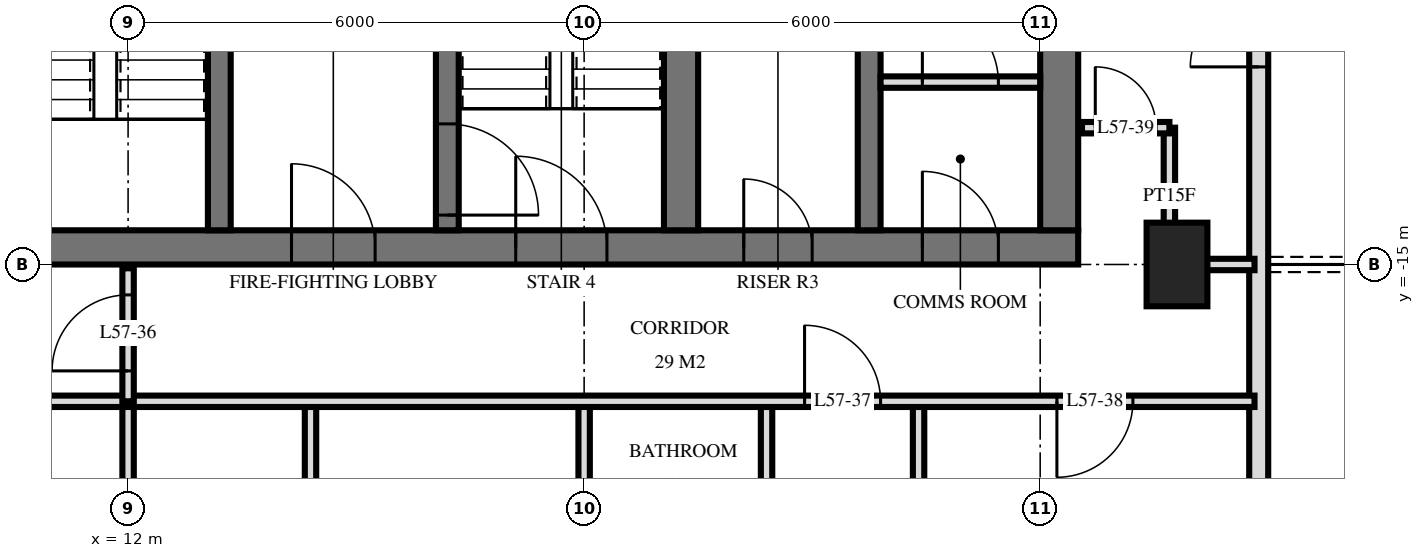
"""IFC4 building model, lengths in metres.
Left out: names, types, materials, properties, quantities, classifications, styles, units other than length and angle.
Written with IfcOpenShell. Run it as: python <this file> out.ifc"""

import sys

from ifc_helpers import new_model, si_unit, direction, frame, frame_2d, origin, origin_2d, place, context, subcontext, project, spatial, rectangle, extrude, element, fill, save


model = new_model("IFC4")
c1 = context("Model", 3, precision=1e-05, world=origin(), true_north=direction((0.0, 1.0)))
c2 = subcontext(c1, "Body", "Model", "MODEL_VIEW")
j1 = project(units=[si_unit("LENGTHUNIT", "METRE"), si_unit("PLANEANGLEUNIT", "RADIAN")], contexts=[c1])
p1 = place(None, origin())
s1 = spatial("IfcSite", under=j1, at=p1, CompositionType="ELEMENT")
p2 = place(p1, origin())
s2 = spatial("IfcBuilding", under=s1, at=p2, CompositionType="ELEMENT")
p3 = place(p2, frame((0.0, 0.0, 218.6)))
s3 = spatial("IfcBuildingStorey", under=s2, at=p3, CompositionType="ELEMENT", Elevation=218.6)
p4 = place(p3, frame((25.8, -15.0, 0.0), z_axis=(0.0, 0.0, 1.0), x_axis=(0.0, 1.0, 0.0)))
e1 = element("IfcColumn", 1, at=p4, inside=s3, PredefinedType="COLUMN", context=c2, shape_type="SweptSolid", body=[
    extrude(rectangle(XDim=1.1, YDim=0.8, at=origin_2d()), origin(), (0.0, 0.0, 1.0), 3.5),
])
p5 = place(p3, frame((10.0, -14.775, 0.0), z_axis=(0.0, 0.0, 1.0), x_axis=(1.0, 0.0, 0.0)))
e2 = element("IfcWall", 2, at=p5, inside=s3, PredefinedType="SHEAR", context=c2, shape_type="SweptSolid", body=[
    extrude(rectangle(XDim=14.5, YDim=0.45, at=frame_2d((7.25, 0.0))), origin(), (0.0, 0.0, 1.0), 3.5),
])
p6 = place(p5, frame((7.1, 0.0, 0.0)))
e3 = element("IfcOpeningElement", 3, at=p6, cuts=e2, PredefinedType="OPENING", context=c2, shape_type="SweptSolid", body=[
    extrude(rectangle(XDim=1.2, YDim=2.1, at=frame_2d((0.6, 1.05))), frame((0.0, 0.235, 0.0), z_axis=(0.0, -1.0, 0.0), x_axis=(1.0, 0.0, 0.0)), (0.0, 0.0, 1.0), 0.47),
])
p7 = place(p5, frame((4.15, 0.0, 0.0)))
e4 = element("IfcOpeningElement", 4, at=p7, cuts=e2, PredefinedType="OPENING", context=c2, shape_type="SweptSolid", body=[
    extrude(rectangle(XDim=1.1, YDim=2.1, at=frame_2d((0.55, 1.05))), frame((0.0, 0.235, 0.0), z_axis=(0.0, -1.0, 0.0), x_axis=(1.0, 0.0, 0.0)), (0.0, 0.0, 1.0), 0.47),
])
p8 = place(p5, frame((10.1, 0.0, 0.0)))
e5 = element("IfcOpeningElement", 5, at=p8, cuts=e2, PredefinedType="OPENING", context=c2, shape_type="SweptSolid", body=[
    extrude(rectangle(XDim=0.9, YDim=2.1, at=frame_2d((0.45, 1.05))), frame((0.0, 0.235, 0.0), z_axis=(0.0, -1.0, 0.0), x_axis=(1.0, 0.0, 0.0)), (0.0, 0.0, 1.0), 0.47),
])
p9 = place(p5, frame((12.45, 0.0, 0.0)))
e6 = element("IfcOpeningElement", 6, at=p9, cuts=e2, PredefinedType="OPENING", context=c2, shape_type="SweptSolid", body=[
    extrude(rectangle(XDim=1.0, YDim=2.1, at=frame_2d((0.5, 1.05))), frame((0.0, 0.235, 0.0), z_axis=(0.0, -1.0, 0.0), x_axis=(1.0, 0.0, 0.0)), (0.0, 0.0, 1.0), 0.47),
])
p10 = place(p3, frame((24.25, -14.55, 0.0), z_axis=(0.0, 0.0, 1.0), x_axis=(0.0, 1.0, 0.0)))
e7 = element("IfcWall", 7, at=p10, inside=s3, PredefinedType="SHEAR", context=c2, shape_type="SweptSolid", body=[
    extrude(rectangle(XDim=14.1, YDim=0.5, at=frame_2d((7.05, 0.0))), origin(), (0.0, 0.0, 1.0), 3.5),
])
p11 = place(p3, frame((13.2, -14.55, 0.0), z_axis=(0.0, 0.0, 1.0), x_axis=(0.0, 1.0, 0.0)))
e8 = element("IfcWall", 8, at=p11, inside=s3, PredefinedType="SHEAR", context=c2, shape_type="SweptSolid", body=[
    extrude(rectangle(XDim=5.4, YDim=0.3, at=frame_2d((2.7, 0.0))), origin(), (0.0, 0.0, 1.0), 3.5),
])
p12 = place(p11, frame((4.0, 0.0, 0.0)))
e9 = element("IfcOpeningElement", 9, at=p12, cuts=e8, PredefinedType="OPENING", context=c2, shape_type="SweptSolid", body=[
    extrude(rectangle(XDim=1.2, YDim=2.1, at=frame_2d((0.6, 1.05))), frame((0.0, 0.16, 0.0), z_axis=(0.0, -1.0, 0.0), x_axis=(1.0, 0.0, 0.0)), (0.0, 0.0, 1.0), 0.32),
])
p13 = place(p3, frame((16.2, -14.55, 0.0), z_axis=(0.0, 0.0, 1.0), x_axis=(0.0, 1.0, 0.0)))
e10 = element("IfcWall", 10, at=p13, inside=s3, PredefinedType="SHEAR", context=c2, shape_type="SweptSolid", body=[
    extrude(rectangle(XDim=5.4, YDim=0.3, at=frame_2d((2.7, 0.0))), origin(), (0.0, 0.0, 1.0), 3.5),
])
p14 = place(p13, frame((0.2, 0.0, 0.0)))
e11 = element("IfcOpeningElement", 11, at=p14, cuts=e10, PredefinedType="OPENING", context=c2, shape_type="SweptSolid", body=[
    extrude(rectangle(XDim=1.2, YDim=2.1, at=frame_2d((0.6, 1.05))), frame((0.0, 0.16, 0.0), z_axis=(0.0, -1.0, 0.0), x_axis=(1.0, 0.0, 0.0)), (0.0, 0.0, 1.0), 0.32),
])
p15 = place(p3, frame((19.275, -14.55, 0.0), z_axis=(0.0, 0.0, 1.0), x_axis=(0.0, 1.0, 0.0)))
e12 = element("IfcWall", 12, at=p15, inside=s3, PredefinedType="SHEAR", context=c2, shape_type="SweptSolid", body=[
    extrude(rectangle(XDim=5.4, YDim=0.45, at=frame_2d((2.7, 0.0))), origin(), (0.0, 0.0, 1.0), 3.5),
])
p16 = place(p3, frame((21.75, -14.55, 0.0), z_axis=(0.0, 0.0, 1.0), x_axis=(0.0, 1.0, 0.0)))
e13 = element("IfcWall", 13, at=p16, inside=s3, PredefinedType="SHEAR", context=c2, shape_type="SweptSolid", body=[
    extrude(rectangle(XDim=5.4, YDim=0.3, at=frame_2d((2.7, 0.0))), origin(), (0.0, 0.0, 1.0), 3.5),
])
p17 = place(p3, frame((26.875, -24.875, 0.0), z_axis=(0.0, 0.0, 1.0), x_axis=(0.0, 1.0, 0.0)))
e14 = element("IfcWall", 14, at=p17, inside=s3, PredefinedType="SOLIDWALL", context=c2, shape_type="SweptSolid", body=[
    extrude(rectangle(XDim=21.551, YDim=0.25, at=frame_2d((10.775, 0.0))), origin(), (0.0, 0.0, 1.0), 3.22),
])
p18 = place(p17, frame((0.575, 0.0, 0.0)))
e15 = element("IfcOpeningElement", 15, at=p18, cuts=e14, PredefinedType="OPENING", context=c2, shape_type="SweptSolid", body=[
    extrude(rectangle(XDim=1.8, YDim=2.4, at=frame_2d((0.9, 1.2))), frame((0.0, 0.135, 0.0), z_axis=(0.0, -1.0, 0.0), x_axis=(1.0, 0.0, 0.0)), (0.0, 0.0, 1.0), 0.27),
])
p19 = place(p17, frame((5.075, 0.0, 0.0)))
e16 = element("IfcOpeningElement", 16, at=p19, cuts=e14, PredefinedType="OPENING", context=c2, shape_type="SweptSolid", body=[
    extrude(rectangle(XDim=1.8, YDim=2.4, at=frame_2d((0.9, 1.2))), frame((0.0, 0.135, 0.0), z_axis=(0.0, -1.0, 0.0), x_axis=(1.0, 0.0, 0.0)), (0.0, 0.0, 1.0), 0.27),
])
p20 = place(p17, frame((12.475, 0.0, 0.0)))
e17 = element("IfcOpeningElement", 17, at=p20, cuts=e14, PredefinedType="OPENING", context=c2, shape_type="SweptSolid", body=[
    extrude(rectangle(XDim=1.8, YDim=2.4, at=frame_2d((0.9, 1.2))), frame((0.0, 0.135, 0.0), z_axis=(0.0, -1.0, 0.0), x_axis=(1.0, 0.0, 0.0)), (0.0, 0.0, 1.0), 0.27),
])
p21 = place(p3, frame((21.9, -12.6, 0.0), z_axis=(0.0, 0.0, 1.0), x_axis=(1.0, 0.0, 0.0)))
e18 = element("IfcWall", 18, at=p21, inside=s3, PredefinedType="PARTITIONING", context=c2, shape_type="SweptSolid", body=[
    extrude(rectangle(XDim=2.1, YDim=0.15, at=frame_2d((1.05, 0.0))), origin(), (0.0, 0.0, 1.0), 3.2),
])
p22 = place(p21, frame((0.55, 0.0, 0.0)))
e19 = element("IfcOpeningElement", 19, at=p22, cuts=e18, PredefinedType="OPENING", context=c2, shape_type="SweptSolid", body=[
    extrude(rectangle(XDim=1.0, YDim=2.1, at=frame_2d((0.5, 1.05))), frame((0.0, 0.085, 0.0), z_axis=(0.0, -1.0, 0.0), x_axis=(1.0, 0.0, 0.0)), (0.0, 0.0, 1.0), 0.17),
])
p23 = place(p3, frame((25.7, -15.0, 0.0), z_axis=(0.0, 0.0, 1.0), x_axis=(0.0, 1.0, 0.0)))
e20 = element("IfcWall", 20, at=p23, inside=s3, PredefinedType="PARTITIONING", context=c2, shape_type="SweptSolid", body=[
    extrude(rectangle(XDim=1.8, YDim=0.15, at=frame_2d((0.9, 0.0))), origin(), (0.0, 0.0, 1.0), 3.22),
])
p24 = place(p3, frame((22.4, -21.0, 0.0), z_axis=(0.0, 0.0, 1.0), x_axis=(0.0, 1.0, 0.0)))
e21 = element("IfcWall", 21, at=p24, inside=s3, PredefinedType="PARTITIONING", context=c2, shape_type="SweptSolid", body=[
    extrude(rectangle(XDim=4.2, YDim=0.15, at=frame_2d((2.1, 0.0))), origin(), (0.0, 0.0, 1.0), 3.22),
])
p25 = place(p3, frame((20.4, -21.0, 0.0), z_axis=(0.0, 0.0, 1.0), x_axis=(0.0, 1.0, 0.0)))
e22 = element("IfcWall", 22, at=p25, inside=s3, PredefinedType="PARTITIONING", context=c2, shape_type="SweptSolid", body=[
    extrude(rectangle(XDim=4.2, YDim=0.15, at=frame_2d((2.1, 0.0))), origin(), (0.0, 0.0, 1.0), 3.22),
])
p26 = place(p25, frame((1.6, 0.0, 0.0)))
e23 = element("IfcOpeningElement", 23, at=p26, cuts=e22, PredefinedType="OPENING", context=c2, shape_type="SweptSolid", body=[
    extrude(rectangle(XDim=1.0, YDim=2.1, at=frame_2d((0.5, 1.05))), frame((0.0, 0.085, 0.0), z_axis=(0.0, -1.0, 0.0), x_axis=(1.0, 0.0, 0.0)), (0.0, 0.0, 1.0), 0.17),
])
for number, where, z_axis, x_axis in (
    (24, (18.0, -21.0, 0.0), (0.0, 0.0, 1.0), (0.0, 1.0, 0.0)),
    (25, (14.4, -21.0, 0.0), (0.0, 0.0, 1.0), (0.0, 1.0, 0.0)),
):
    element("IfcWall", number, at=place(p3, frame(where, z_axis=z_axis, x_axis=x_axis)), inside=s3, PredefinedType="PARTITIONING", context=c2, shape_type="SweptSolid", body=[
        extrude(rectangle(XDim=4.2, YDim=0.15, at=frame_2d((2.1, 0.0))), origin(), (0.0, 0.0, 1.0), 3.22),
    ])
p27 = place(p3, frame((12.0, -16.8, 0.0), z_axis=(0.0, 0.0, 1.0), x_axis=(0.0, 1.0, 0.0)))
e26 = element("IfcWall", 26, at=p27, inside=s3, PredefinedType="PARTITIONING", context=c2, shape_type="SweptSolid", body=[
    extrude(rectangle(XDim=1.75, YDim=0.15, at=frame_2d((0.875, 0.0))), origin(), (0.0, 0.0, 1.0), 3.22),
])
p28 = place(p27, frame((0.4, 0.0, 0.0)))
e27 = element("IfcOpeningElement", 27, at=p28, cuts=e26, PredefinedType="OPENING", context=c2, shape_type="SweptSolid", body=[
    extrude(rectangle(XDim=1.0, YDim=2.1, at=frame_2d((0.5, 1.05))), frame((0.0, 0.085, 0.0), z_axis=(0.0, -1.0, 0.0), x_axis=(1.0, 0.0, 0.0)), (0.0, 0.0, 1.0), 0.17),
])
p29 = place(p3, frame((12.0, -29.22, 0.0), z_axis=(0.0, 0.0, 1.0), x_axis=(0.0, 1.0, 0.0)))
e28 = element("IfcWall", 28, at=p29, inside=s3, PredefinedType="PARTITIONING", context=c2, shape_type="SweptSolid", body=[
    extrude(rectangle(XDim=12.42, YDim=0.15, at=frame_2d((6.21, 0.0))), origin(), (0.0, 0.0, 1.0), 3.22),
])
p30 = place(p3, frame((-26.82, -16.8, 0.0), z_axis=(0.0, 0.0, 1.0), x_axis=(1.0, 0.0, 0.0)))
e29 = element("IfcWall", 29, at=p30, inside=s3, PredefinedType="PARTITIONING", context=c2, shape_type="SweptSolid", body=[
    extrude(rectangle(XDim=53.64, YDim=0.15, at=frame_2d((26.82, 0.0))), origin(), (0.0, 0.0, 1.0), 3.22),
])
p31 = place(p30, frame((11.17, 0.0, 0.0)))
e30 = element("IfcOpeningElement", 30, at=p31, cuts=e29, PredefinedType="OPENING", context=c2, shape_type="SweptSolid", body=[
    extrude(rectangle(XDim=1.0, YDim=2.1, at=frame_2d((0.5, 1.05))), frame((0.0, 0.085, 0.0), z_axis=(0.0, -1.0, 0.0), x_axis=(1.0, 0.0, 0.0)), (0.0, 0.0, 1.0), 0.17),
])
p32 = place(p30, frame((3.22, 0.0, 0.0)))
e31 = element("IfcOpeningElement", 31, at=p32, cuts=e29, PredefinedType="OPENING", context=c2, shape_type="SweptSolid", body=[
    extrude(rectangle(XDim=1.0, YDim=2.1, at=frame_2d((0.5, 1.05))), frame((0.0, 0.085, 0.0), z_axis=(0.0, -1.0, 0.0), x_axis=(1.0, 0.0, 0.0)), (0.0, 0.0, 1.0), 0.17),
])
p33 = place(p30, frame((5.02, 0.0, 0.0)))
e32 = element("IfcOpeningElement", 32, at=p33, cuts=e29, PredefinedType="OPENING", context=c2, shape_type="SweptSolid", body=[
    extrude(rectangle(XDim=1.0, YDim=2.1, at=frame_2d((0.5, 1.05))), frame((0.0, 0.085, 0.0), z_axis=(0.0, -1.0, 0.0), x_axis=(1.0, 0.0, 0.0)), (0.0, 0.0, 1.0), 0.17),
])
p34 = place(p30, frame((47.72, 0.0, 0.0)))
e33 = element("IfcOpeningElement", 33, at=p34, cuts=e29, PredefinedType="OPENING", context=c2, shape_type="SweptSolid", body=[
    extrude(rectangle(XDim=1.0, YDim=2.1, at=frame_2d((0.5, 1.05))), frame((0.0, 0.085, 0.0), z_axis=(0.0, -1.0, 0.0), x_axis=(1.0, 0.0, 0.0)), (0.0, 0.0, 1.0), 0.17),
])
p35 = place(p30, frame((51.04, 0.0, 0.0)))
e34 = element("IfcOpeningElement", 34, at=p35, cuts=e29, PredefinedType="OPENING", context=c2, shape_type="SweptSolid", body=[
    extrude(rectangle(XDim=1.0, YDim=2.1, at=frame_2d((0.5, 1.05))), frame((0.0, 0.085, 0.0), z_axis=(0.0, -1.0, 0.0), x_axis=(1.0, 0.0, 0.0)), (0.0, 0.0, 1.0), 0.17),
])
p36 = place(p30, frame((17.32, 0.0, 0.0)))
e35 = element("IfcOpeningElement", 35, at=p36, cuts=e29, PredefinedType="OPENING", context=c2, shape_type="SweptSolid", body=[
    extrude(rectangle(XDim=1.0, YDim=2.1, at=frame_2d((0.5, 1.05))), frame((0.0, 0.085, 0.0), z_axis=(0.0, -1.0, 0.0), x_axis=(1.0, 0.0, 0.0)), (0.0, 0.0, 1.0), 0.17),
])
p37 = place(p30, frame((26.32, 0.0, 0.0)))
e36 = element("IfcOpeningElement", 36, at=p37, cuts=e29, PredefinedType="OPENING", context=c2, shape_type="SweptSolid", body=[
    extrude(rectangle(XDim=1.0, YDim=2.1, at=frame_2d((0.5, 1.05))), frame((0.0, 0.085, 0.0), z_axis=(0.0, -1.0, 0.0), x_axis=(1.0, 0.0, 0.0)), (0.0, 0.0, 1.0), 0.17),
])
p38 = place(p30, frame((35.32, 0.0, 0.0)))
e37 = element("IfcOpeningElement", 37, at=p38, cuts=e29, PredefinedType="OPENING", context=c2, shape_type="SweptSolid", body=[
    extrude(rectangle(XDim=1.0, YDim=2.1, at=frame_2d((0.5, 1.05))), frame((0.0, 0.085, 0.0), z_axis=(0.0, -1.0, 0.0), x_axis=(1.0, 0.0, 0.0)), (0.0, 0.0, 1.0), 0.17),
])
p39 = place(p3, frame((25.7, -15.0, 0.0), z_axis=(0.0, 0.0, 1.0), x_axis=(1.0, 0.0, 0.0)))
e38 = element("IfcWall", 38, at=p39, inside=s3, PredefinedType="PARTITIONING", context=c2, shape_type="SweptSolid", body=[
    extrude(rectangle(XDim=1.12, YDim=0.15, at=frame_2d((0.56, 0.0))), origin(), (0.0, 0.0, 1.0), 3.22),
])
p40 = place(p3, frame((24.55, -13.2, 0.0), z_axis=(0.0, 0.0, 1.0), x_axis=(1.0, 0.0, 0.0)))
e39 = element("IfcWall", 39, at=p40, inside=s3, PredefinedType="PARTITIONING", context=c2, shape_type="SweptSolid", body=[
    extrude(rectangle(XDim=1.15, YDim=0.15, at=frame_2d((0.575, 0.0))), origin(), (0.0, 0.0, 1.0), 3.22),
])
p41 = place(p40, frame((0.175, 0.0, 0.0)))
e40 = element("IfcOpeningElement", 40, at=p41, cuts=e39, PredefinedType="OPENING", context=c2, shape_type="SweptSolid", body=[
    extrude(rectangle(XDim=0.8, YDim=2.1, at=frame_2d((0.4, 1.05))), frame((0.0, 0.085, 0.0), z_axis=(0.0, -1.0, 0.0), x_axis=(1.0, 0.0, 0.0)), (0.0, 0.0, 1.0), 0.17),
])
p42 = place(p20, origin())
e41 = element("IfcDoor", 41, at=p42, inside=s3, OperationType="DOUBLE_DOOR_SINGLE_SWING", PredefinedType="DOOR", context=c2, shape_type="SweptSolid", body=[
    extrude(rectangle(XDim=1.8, YDim=2.4, at=frame_2d((0.9, 1.2))), frame((0.0, 0.025, 0.0), z_axis=(0.0, -1.0, 0.0), x_axis=(1.0, 0.0, 0.0)), (0.0, 0.0, 1.0), 0.05),
])
fill(e17, e41)
p43 = place(p6, origin())
e42 = element("IfcDoor", 42, at=p43, inside=s3, OperationType="SINGLE_SWING_RIGHT", PredefinedType="DOOR", context=c2, shape_type="SweptSolid", body=[
    extrude(rectangle(XDim=1.2, YDim=2.1, at=frame_2d((0.6, 1.05))), frame((0.0, 0.025, 0.0), z_axis=(0.0, -1.0, 0.0), x_axis=(1.0, 0.0, 0.0)), (0.0, 0.0, 1.0), 0.05),
])
fill(e3, e42)
p44 = place(p7, origin())
e43 = element("IfcDoor", 43, at=p44, inside=s3, OperationType="SINGLE_SWING_RIGHT", PredefinedType="DOOR", context=c2, shape_type="SweptSolid", body=[
    extrude(rectangle(XDim=1.1, YDim=2.1, at=frame_2d((0.55, 1.05))), frame((0.0, 0.025, 0.0), z_axis=(0.0, -1.0, 0.0), x_axis=(1.0, 0.0, 0.0)), (0.0, 0.0, 1.0), 0.05),
])
fill(e4, e43)
p45 = place(p8, origin())
e44 = element("IfcDoor", 44, at=p45, inside=s3, OperationType="SINGLE_SWING_RIGHT", PredefinedType="DOOR", context=c2, shape_type="SweptSolid", body=[
    extrude(rectangle(XDim=0.9, YDim=2.1, at=frame_2d((0.45, 1.05))), frame((0.0, 0.025, 0.0), z_axis=(0.0, -1.0, 0.0), x_axis=(1.0, 0.0, 0.0)), (0.0, 0.0, 1.0), 0.05),
])
fill(e5, e44)
p46 = place(p9, origin())
e45 = element("IfcDoor", 45, at=p46, inside=s3, OperationType="SINGLE_SWING_RIGHT", PredefinedType="DOOR", context=c2, shape_type="SweptSolid", body=[
    extrude(rectangle(XDim=1.0, YDim=2.1, at=frame_2d((0.5, 1.05))), frame((0.0, 0.025, 0.0), z_axis=(0.0, -1.0, 0.0), x_axis=(1.0, 0.0, 0.0)), (0.0, 0.0, 1.0), 0.05),
])
fill(e6, e45)
p47 = place(p14, frame((0.6, 0.0, 0.0), z_axis=(0.0, 0.0, 1.0), x_axis=(-1.0, 0.0, 0.0)))
e46 = element("IfcDoor", 46, at=p47, inside=s3, OperationType="SINGLE_SWING_LEFT", PredefinedType="DOOR", context=c2, shape_type="SweptSolid", body=[
    extrude(rectangle(XDim=1.2, YDim=2.1, at=frame_2d((0.0, 1.05))), frame((0.0, -0.025, 0.0), z_axis=(0.0, 1.0, 0.0), x_axis=(-1.0, 0.0, 0.0)), (0.0, 0.0, 1.0), 0.05),
])
fill(e11, e46)
p48 = place(p22, origin())
e47 = element("IfcDoor", 47, at=p48, inside=s3, OperationType="SINGLE_SWING_RIGHT", PredefinedType="DOOR", context=c2, shape_type="SweptSolid", body=[
    extrude(rectangle(XDim=1.0, YDim=2.1, at=frame_2d((0.5, 1.05))), frame((0.0, 0.025, 0.0), z_axis=(0.0, -1.0, 0.0), x_axis=(1.0, 0.0, 0.0)), (0.0, 0.0, 1.0), 0.05),
])
fill(e19, e47)
p49 = place(p28, origin())
e48 = element("IfcDoor", 48, at=p49, inside=s3, OperationType="SINGLE_SWING_RIGHT", PredefinedType="DOOR", context=c2, shape_type="SweptSolid", body=[
    extrude(rectangle(XDim=1.0, YDim=2.1, at=frame_2d((0.5, 1.05))), frame((0.0, 0.025, 0.0), z_axis=(0.0, -1.0, 0.0), x_axis=(1.0, 0.0, 0.0)), (0.0, 0.0, 1.0), 0.05),
])
fill(e27, e48)
p50 = place(p34, origin())
e49 = element("IfcDoor", 49, at=p50, inside=s3, OperationType="SINGLE_SWING_RIGHT", PredefinedType="DOOR", context=c2, shape_type="SweptSolid", body=[
    extrude(rectangle(XDim=1.0, YDim=2.1, at=frame_2d((0.5, 1.05))), frame((0.0, 0.025, 0.0), z_axis=(0.0, -1.0, 0.0), x_axis=(1.0, 0.0, 0.0)), (0.0, 0.0, 1.0), 0.05),
])
fill(e33, e49)
p51 = place(p35, frame((0.5, 0.0, 0.0), z_axis=(0.0, 0.0, 1.0), x_axis=(-1.0, 0.0, 0.0)))
e50 = element("IfcDoor", 50, at=p51, inside=s3, OperationType="SINGLE_SWING_LEFT", PredefinedType="DOOR", context=c2, shape_type="SweptSolid", body=[
    extrude(rectangle(XDim=1.0, YDim=2.1, at=frame_2d((0.0, 1.05))), frame((0.0, -0.025, 0.0), z_axis=(0.0, 1.0, 0.0), x_axis=(-1.0, 0.0, 0.0)), (0.0, 0.0, 1.0), 0.05),
])
fill(e34, e50)
p52 = place(p41, origin())
e51 = element("IfcDoor", 51, at=p52, inside=s3, OperationType="SINGLE_SWING_RIGHT", PredefinedType="DOOR", context=c2, shape_type="SweptSolid", body=[
    extrude(rectangle(XDim=0.8, YDim=2.1, at=frame_2d((0.4, 1.05))), frame((0.0, 0.025, 0.0), z_axis=(0.0, -1.0, 0.0), x_axis=(1.0, 0.0, 0.0)), (0.0, 0.0, 1.0), 0.05),
])
fill(e40, e51)
save(model, sys.argv[1])
